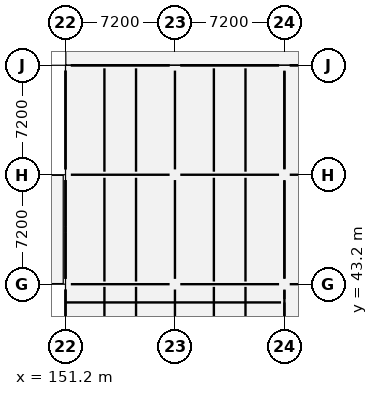
"""IFC4 building model, lengths in metres.
Left out: names, types, materials, properties, quantities, classifications, styles, units other than length and angle.
Written with IfcOpenShell. Run it as: python <this file> out.ifc"""

import sys

from ifc_helpers import new_model, si_unit, direction, frame, frame_2d, origin, origin_2d, place, context, subcontext, project, spatial, rectangle, extrude, element, fill, save


model = new_model("IFC4")
c1 = context("Model", 3, precision=1e-05, world=origin(), true_north=direction((0.0, 1.0)))
c2 = subcontext(c1, "Body", "Model", "MODEL_VIEW")
j1 = project(units=[si_unit("LENGTHUNIT", "METRE"), si_unit("PLANEANGLEUNIT", "RADIAN")], contexts=[c1])
p1 = place(None, origin())
s1 = spatial("IfcSite", under=j1, at=p1, CompositionType="ELEMENT")
p2 = place(p1, origin())
s2 = spatial("IfcBuilding", under=s1, at=p2, CompositionType="ELEMENT")
p3 = place(p2, frame((0.0, 0.0, 9.6)))
s3 = spatial("IfcBuildingStorey", under=s2, at=p3, CompositionType="ELEMENT", Elevation=9.6)
for number, where, z_axis, x_axis in (
    (1, (151.2, 43.2, 0.0), (0.0, 0.0, 1.0), (1.0, 0.0, 0.0)),
    (2, (151.2, 50.4, 0.0), (0.0, 0.0, 1.0), (1.0, 0.0, 0.0)),
    (3, (151.2, 57.6, 0.0), (0.0, 0.0, 1.0), (1.0, 0.0, 0.0)),
    (4, (158.4, 43.2, 0.0), (0.0, 0.0, 1.0), (1.0, 0.0, 0.0)),
    (5, (158.4, 50.4, 0.0), (0.0, 0.0, 1.0), (1.0, 0.0, 0.0)),
    (6, (158.4, 57.6, 0.0), (0.0, 0.0, 1.0), (1.0, 0.0, 0.0)),
    (7, (165.6, 43.2, 0.0), (0.0, 0.0, 1.0), (1.0, 0.0, 0.0)),
    (8, (165.6, 50.4, 0.0), (0.0, 0.0, 1.0), (1.0, 0.0, 0.0)),
    (9, (165.6, 57.6, 0.0), (0.0, 0.0, 1.0), (1.0, 0.0, 0.0)),
):
    element("IfcColumn", number, at=place(p3, frame(where, z_axis=z_axis, x_axis=x_axis)), inside=s3, PredefinedType="COLUMN", context=c2, shape_type="SweptSolid", body=[
        extrude(rectangle(XDim=0.7, YDim=0.7, at=origin_2d()), origin(), (0.0, 0.0, 1.0), 3.9),
    ])
p4 = place(p3, frame((151.2, 46.6, 0.0), z_axis=(0.0, 0.0, 1.0), x_axis=(0.0, 1.0, 0.0)))
e10 = element("IfcWall", 10, at=p4, inside=s3, PredefinedType="SOLIDWALL", context=c2, shape_type="SweptSolid", body=[
    extrude(rectangle(XDim=0.4, YDim=0.36, at=frame_2d((0.2, 0.0))), origin(), (0.0, 0.0, 1.0), 3.0),
])
p5 = place(p3, frame((151.2, 53.8, 0.0), z_axis=(0.0, 0.0, 1.0), x_axis=(0.0, 1.0, 0.0)))
e11 = element("IfcWall", 11, at=p5, inside=s3, PredefinedType="SOLIDWALL", context=c2, shape_type="SweptSolid", body=[
    extrude(rectangle(XDim=0.4, YDim=0.36, at=frame_2d((0.2, 0.0))), origin(), (0.0, 0.0, 1.0), 3.05),
])
p6 = place(p3, frame((151.55, 57.6, 0.0), z_axis=(0.0, 0.0, 1.0), x_axis=(1.0, 0.0, 0.0)))
e12 = element("IfcWall", 12, at=p6, inside=s3, PredefinedType="ELEMENTEDWALL", context=c2, shape_type="SweptSolid", body=[
    extrude(rectangle(XDim=6.5, YDim=0.28, at=frame_2d((3.25, 0.0))), origin(), (0.0, 0.0, 1.0), 2.95),
])
p7 = place(p6, frame((2.5, 0.0, 0.0)))
e13 = element("IfcOpeningElement", 13, at=p7, cuts=e12, PredefinedType="OPENING", context=c2, shape_type="SweptSolid", body=[
    extrude(rectangle(XDim=1.5, YDim=2.2, at=frame_2d((0.75, 1.1))), frame((0.0, 0.152, 0.0), z_axis=(0.0, -1.0, 0.0), x_axis=(1.0, 0.0, 0.0)), (0.0, 0.0, 1.0), 0.304),
])
p8 = place(p3, frame((158.75, 57.6, 0.0), z_axis=(0.0, 0.0, 1.0), x_axis=(1.0, 0.0, 0.0)))
e14 = element("IfcWall", 14, at=p8, inside=s3, PredefinedType="ELEMENTEDWALL", context=c2, shape_type="SweptSolid", body=[
    extrude(rectangle(XDim=6.5, YDim=0.28, at=frame_2d((3.25, 0.0))), origin(), (0.0, 0.0, 1.0), 2.9),
])
p9 = place(p3, frame((165.95, 57.6, 0.0), z_axis=(0.0, 0.0, 1.0), x_axis=(1.0, 0.0, 0.0)))
e15 = element("IfcWall", 15, at=p9, inside=s3, PredefinedType="ELEMENTEDWALL", context=c2, shape_type="SweptSolid", body=[
    extrude(rectangle(XDim=6.5, YDim=0.28, at=frame_2d((3.25, 0.0))), origin(), (0.0, 0.0, 1.0), 2.95),
])
p10 = place(p9, frame((2.425, 0.0, 0.85)))
e16 = element("IfcOpeningElement", 16, at=p10, cuts=e15, PredefinedType="OPENING", context=c2, shape_type="SweptSolid", body=[
    extrude(rectangle(XDim=1.65, YDim=1.9, at=frame_2d((0.825, 0.95))), frame((0.0, 0.152, 0.0), z_axis=(0.0, -1.0, 0.0), x_axis=(1.0, 0.0, 0.0)), (0.0, 0.0, 1.0), 0.304),
])
p11 = place(p3, frame((165.6, 36.39, 0.0), z_axis=(0.0, 0.0, 1.0), x_axis=(0.0, 1.0, 0.0)))
e17 = element("IfcWall", 17, at=p11, inside=s3, PredefinedType="PARTITIONING", context=c2, shape_type="SweptSolid", body=[
    extrude(rectangle(XDim=5.61, YDim=0.12, at=frame_2d((2.805, 0.0))), origin(), (0.0, 0.0, 1.0), 3.038),
])
p12 = place(p3, frame((151.2, 42.0, 0.0), z_axis=(0.0, 0.0, 1.0), x_axis=(1.0, 0.0, 0.0)))
e18 = element("IfcWall", 18, at=p12, inside=s3, PredefinedType="PARTITIONING", context=c2, shape_type="SweptSolid", body=[
    extrude(rectangle(XDim=14.18, YDim=0.12, at=frame_2d((7.09, 0.0))), origin(), (0.0, 0.0, 1.0), 3.038),
])
p13 = place(p3, frame((165.6, 42.22, 0.0), z_axis=(0.0, 0.0, 1.0), x_axis=(0.0, 1.0, 0.0)))
e19 = element("IfcWall", 19, at=p13, inside=s3, PredefinedType="PARTITIONING", context=c2, shape_type="SweptSolid", body=[
    extrude(rectangle(XDim=0.59, YDim=0.1, at=frame_2d((0.295, 0.0))), origin(), (0.0, 0.0, 1.0), 3.038),
])
p14 = place(p3, frame((165.6, 43.59, 0.0), z_axis=(0.0, 0.0, 1.0), x_axis=(0.0, 1.0, 0.0)))
e20 = element("IfcWall", 20, at=p14, inside=s3, PredefinedType="PARTITIONING", context=c2, shape_type="SweptSolid", body=[
    extrude(rectangle(XDim=6.42, YDim=0.1, at=frame_2d((3.21, 0.0))), origin(), (0.0, 0.0, 1.0), 2.998),
])
p15 = place(p14, frame((2.685, 0.0, 0.0)))
e21 = element("IfcOpeningElement", 21, at=p15, cuts=e20, PredefinedType="OPENING", context=c2, shape_type="SweptSolid", body=[
    extrude(rectangle(XDim=1.05, YDim=2.15, at=frame_2d((0.525, 1.075))), frame((0.0, 0.062, 0.0), z_axis=(0.0, -1.0, 0.0), x_axis=(1.0, 0.0, 0.0)), (0.0, 0.0, 1.0), 0.124),
])
p16 = place(p3, frame((165.6, 50.79, 0.0), z_axis=(0.0, 0.0, 1.0), x_axis=(0.0, 1.0, 0.0)))
e22 = element("IfcWall", 22, at=p16, inside=s3, PredefinedType="PARTITIONING", context=c2, shape_type="SweptSolid", body=[
    extrude(rectangle(XDim=6.42, YDim=0.1, at=frame_2d((3.21, 0.0))), origin(), (0.0, 0.0, 1.0), 3.048),
])
p17 = place(p7, origin())
e23 = element("IfcDoor", 23, at=p17, inside=s3, OperationType="DOUBLE_SWING_LEFT", PredefinedType="DOOR", context=c2, shape_type="SweptSolid", body=[
    extrude(rectangle(XDim=1.5, YDim=2.2, at=frame_2d((0.75, 1.1))), frame((0.0, 0.025, 0.0), z_axis=(0.0, -1.0, 0.0), x_axis=(1.0, 0.0, 0.0)), (0.0, 0.0, 1.0), 0.05),
])
fill(e13, e23)
p18 = place(p15, origin())
e24 = element("IfcDoor", 24, at=p18, inside=s3, OperationType="SINGLE_SWING_RIGHT", PredefinedType="DOOR", context=c2, shape_type="SweptSolid", body=[
    extrude(rectangle(XDim=1.05, YDim=2.15, at=frame_2d((0.525, 1.075))), frame((0.0, 0.025, 0.0), z_axis=(0.0, -1.0, 0.0), x_axis=(1.0, 0.0, 0.0)), (0.0, 0.0, 1.0), 0.05),
])
fill(e21, e24)
save(model, sys.argv[1])
